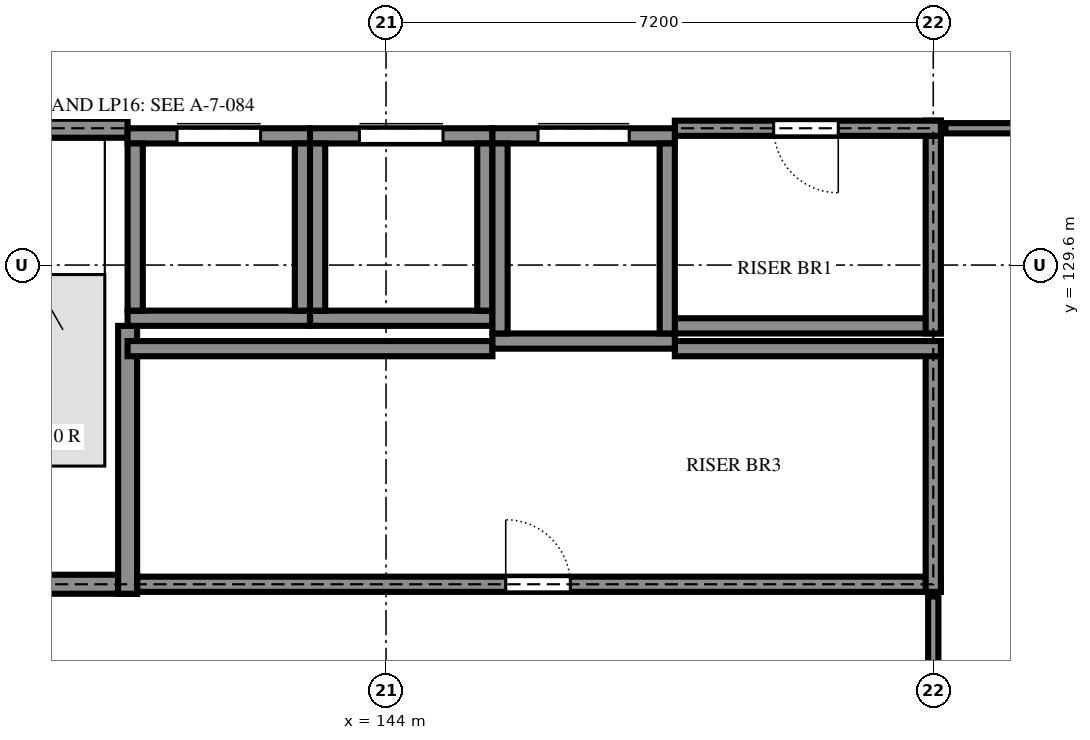
"""IFC4 building model, lengths in metres.
Left out: names, types, materials, properties, quantities, classifications, styles, units other than length and angle.
Written with IfcOpenShell. Run it as: python <this file> out.ifc"""

import sys

from ifc_helpers import new_model, si_unit, direction, frame, frame_2d, origin, place, context, subcontext, project, spatial, rectangle, extrude, element, fill, save


model = new_model("IFC4")
c1 = context("Model", 3, precision=1e-05, world=origin(), true_north=direction((0.0, 1.0)))
c2 = subcontext(c1, "Body", "Model", "MODEL_VIEW")
j1 = project(units=[si_unit("LENGTHUNIT", "METRE"), si_unit("PLANEANGLEUNIT", "RADIAN")], contexts=[c1])
p1 = place(None, origin())
s1 = spatial("IfcSite", under=j1, at=p1, CompositionType="ELEMENT")
p2 = place(p1, origin())
s2 = spatial("IfcBuilding", under=s1, at=p2, CompositionType="ELEMENT")
p3 = place(p2, frame((0.0, 0.0, 3.6)))
s3 = spatial("IfcBuildingStorey", under=s2, at=p3, CompositionType="ELEMENT", Elevation=3.6)
p4 = place(p3, frame((136.675, 125.4, 0.0), z_axis=(0.0, 0.0, 1.0), x_axis=(1.0, 0.0, 0.0)))
e1 = element("IfcWall", 1, at=p4, inside=s3, PredefinedType="SHEAR", context=c2, shape_type="SweptSolid", body=[
    extrude(rectangle(XDim=4.05, YDim=0.25, at=frame_2d((2.025, 0.0))), origin(), (0.0, 0.0, 1.0), 3.6),
])
p5 = place(p4, frame((1.375, 0.0, 0.0)))
e2 = element("IfcOpeningElement", 2, at=p5, cuts=e1, PredefinedType="OPENING", context=c2, shape_type="SweptSolid", body=[
    extrude(rectangle(XDim=1.2, YDim=2.4, at=frame_2d((0.6, 1.2))), frame((0.0, 0.135, 0.0), z_axis=(0.0, -1.0, 0.0), x_axis=(1.0, 0.0, 0.0)), (0.0, 0.0, 1.0), 0.27),
])
p6 = place(p3, frame((140.725, 125.4, 0.0), z_axis=(0.0, 0.0, 1.0), x_axis=(1.0, 0.0, 0.0)))
e3 = element("IfcWall", 3, at=p6, inside=s3, PredefinedType="SHEAR", context=c2, shape_type="SweptSolid", body=[
    extrude(rectangle(XDim=10.575, YDim=0.2, at=frame_2d((5.288, 0.0))), origin(), (0.0, 0.0, 1.0), 3.6),
])
p7 = place(p6, frame((4.85, 0.0, 0.0)))
e4 = element("IfcOpeningElement", 4, at=p7, cuts=e3, PredefinedType="OPENING", context=c2, shape_type="SweptSolid", body=[
    extrude(rectangle(XDim=0.85, YDim=2.1, at=frame_2d((0.425, 1.05))), frame((0.0, 0.11, 0.0), z_axis=(0.0, -1.0, 0.0), x_axis=(1.0, 0.0, 0.0)), (0.0, 0.0, 1.0), 0.22),
])
p8 = place(p3, frame((140.6, 125.275, 0.0), z_axis=(0.0, 0.0, 1.0), x_axis=(0.0, 1.0, 0.0)))
e5 = element("IfcWall", 5, at=p8, inside=s3, PredefinedType="SHEAR", context=c2, shape_type="SweptSolid", body=[
    extrude(rectangle(XDim=3.525, YDim=0.25, at=frame_2d((1.763, 0.0))), origin(), (0.0, 0.0, 1.0), 3.6),
])
p9 = place(p3, frame((151.2, 125.3, 0.0), z_axis=(0.0, 0.0, 1.0), x_axis=(0.0, 1.0, 0.0)))
e6 = element("IfcWall", 6, at=p9, inside=s3, PredefinedType="SHEAR", context=c2, shape_type="SweptSolid", body=[
    extrude(rectangle(XDim=3.3, YDim=0.2, at=frame_2d((1.65, 0.0))), origin(), (0.0, 0.0, 1.0), 3.6),
])
p10 = place(p3, frame((140.6, 128.5, 0.0), z_axis=(0.0, 0.0, 1.0), x_axis=(1.0, 0.0, 0.0)))
e7 = element("IfcWall", 7, at=p10, inside=s3, PredefinedType="SHEAR", context=c2, shape_type="SweptSolid", body=[
    extrude(rectangle(XDim=4.8, YDim=0.2, at=frame_2d((2.4, 0.0))), origin(), (0.0, 0.0, 1.0), 3.6),
])
for number, where, z_axis, x_axis in (
    (8, (147.8, 128.5, 0.0), (0.0, 0.0, 1.0), (1.0, 0.0, 0.0)),
    (9, (147.8, 128.8, 0.0), (0.0, 0.0, 1.0), (1.0, 0.0, 0.0)),
):
    element("IfcWall", number, at=place(p3, frame(where, z_axis=z_axis, x_axis=x_axis)), inside=s3, PredefinedType="SHEAR", context=c2, shape_type="SweptSolid", body=[
        extrude(rectangle(XDim=3.5, YDim=0.2, at=frame_2d((1.75, 0.0))), origin(), (0.0, 0.0, 1.0), 3.6),
    ])
p11 = place(p3, frame((151.2, 128.7, 0.0), z_axis=(0.0, 0.0, 1.0), x_axis=(0.0, 1.0, 0.0)))
e10 = element("IfcWall", 10, at=p11, inside=s3, PredefinedType="SHEAR", context=c2, shape_type="SweptSolid", body=[
    extrude(rectangle(XDim=2.8, YDim=0.2, at=frame_2d((1.4, 0.0))), origin(), (0.0, 0.0, 1.0), 3.6),
])
p12 = place(p3, frame((140.6, 131.4, 0.0), z_axis=(0.0, 0.0, 1.0), x_axis=(-1.0, 0.0, 0.0)))
e11 = element("IfcWall", 11, at=p12, inside=s3, PredefinedType="SHEAR", context=c2, shape_type="SweptSolid", body=[
    extrude(rectangle(XDim=3.925, YDim=0.25, at=frame_2d((1.962, 0.0))), origin(), (0.0, 0.0, 1.0), 3.6),
])
p13 = place(p3, frame((151.3, 131.4, 0.0), z_axis=(0.0, 0.0, 1.0), x_axis=(-1.0, 0.0, 0.0)))
e12 = element("IfcWall", 12, at=p13, inside=s3, PredefinedType="SHEAR", context=c2, shape_type="SweptSolid", body=[
    extrude(rectangle(XDim=3.5, YDim=0.2, at=frame_2d((1.75, 0.0))), origin(), (0.0, 0.0, 1.0), 3.6),
])
p14 = place(p13, frame((1.35, 0.0, 0.0)))
e13 = element("IfcOpeningElement", 13, at=p14, cuts=e12, PredefinedType="OPENING", context=c2, shape_type="SweptSolid", body=[
    extrude(rectangle(XDim=0.85, YDim=2.1, at=frame_2d((0.425, 1.05))), frame((0.0, 0.11, 0.0), z_axis=(0.0, -1.0, 0.0), x_axis=(1.0, 0.0, 0.0)), (0.0, 0.0, 1.0), 0.22),
])
p15 = place(p3, frame((140.6, 128.9, 0.0), z_axis=(0.0, 0.0, 1.0), x_axis=(1.0, 0.0, 0.0)))
e14 = element("IfcWall", 14, at=p15, inside=s3, PredefinedType="SHEAR", context=c2, shape_type="SweptSolid", body=[
    extrude(rectangle(XDim=2.4, YDim=0.2, at=frame_2d((1.2, 0.0))), origin(), (0.0, 0.0, 1.0), 3.6),
])
p16 = place(p3, frame((140.6, 131.3, 0.0), z_axis=(0.0, 0.0, 1.0), x_axis=(1.0, 0.0, 0.0)))
e15 = element("IfcWall", 15, at=p16, inside=s3, PredefinedType="SHEAR", context=c2, shape_type="SweptSolid", body=[
    extrude(rectangle(XDim=2.4, YDim=0.2, at=frame_2d((1.2, 0.0))), origin(), (0.0, 0.0, 1.0), 3.6),
])
p17 = place(p16, frame((0.65, 0.0, 0.0)))
e16 = element("IfcOpeningElement", 16, at=p17, cuts=e15, PredefinedType="OPENING", context=c2, shape_type="SweptSolid", body=[
    extrude(rectangle(XDim=1.1, YDim=2.1, at=frame_2d((0.55, 1.05))), frame((0.0, 0.11, 0.0), z_axis=(0.0, -1.0, 0.0), x_axis=(1.0, 0.0, 0.0)), (0.0, 0.0, 1.0), 0.22),
])
for number, where, z_axis, x_axis in (
    (17, (140.7, 129.0, 0.0), (0.0, 0.0, 1.0), (0.0, 1.0, 0.0)),
    (18, (142.9, 129.0, 0.0), (0.0, 0.0, 1.0), (0.0, 1.0, 0.0)),
):
    element("IfcWall", number, at=place(p3, frame(where, z_axis=z_axis, x_axis=x_axis)), inside=s3, PredefinedType="SHEAR", context=c2, shape_type="SweptSolid", body=[
        extrude(rectangle(XDim=2.2, YDim=0.2, at=frame_2d((1.1, 0.0))), origin(), (0.0, 0.0, 1.0), 3.6),
    ])
p18 = place(p3, frame((143.0, 128.9, 0.0), z_axis=(0.0, 0.0, 1.0), x_axis=(1.0, 0.0, 0.0)))
e19 = element("IfcWall", 19, at=p18, inside=s3, PredefinedType="SHEAR", context=c2, shape_type="SweptSolid", body=[
    extrude(rectangle(XDim=2.4, YDim=0.2, at=frame_2d((1.2, 0.0))), origin(), (0.0, 0.0, 1.0), 3.6),
])
p19 = place(p3, frame((143.0, 131.3, 0.0), z_axis=(0.0, 0.0, 1.0), x_axis=(1.0, 0.0, 0.0)))
e20 = element("IfcWall", 20, at=p19, inside=s3, PredefinedType="SHEAR", context=c2, shape_type="SweptSolid", body=[
    extrude(rectangle(XDim=2.4, YDim=0.2, at=frame_2d((1.2, 0.0))), origin(), (0.0, 0.0, 1.0), 3.6),
])
p20 = place(p19, frame((0.65, 0.0, 0.0)))
e21 = element("IfcOpeningElement", 21, at=p20, cuts=e20, PredefinedType="OPENING", context=c2, shape_type="SweptSolid", body=[
    extrude(rectangle(XDim=1.1, YDim=2.1, at=frame_2d((0.55, 1.05))), frame((0.0, 0.11, 0.0), z_axis=(0.0, -1.0, 0.0), x_axis=(1.0, 0.0, 0.0)), (0.0, 0.0, 1.0), 0.22),
])
for number, where, z_axis, x_axis in (
    (22, (143.1, 129.0, 0.0), (0.0, 0.0, 1.0), (0.0, 1.0, 0.0)),
    (23, (145.3, 129.0, 0.0), (0.0, 0.0, 1.0), (0.0, 1.0, 0.0)),
):
    element("IfcWall", number, at=place(p3, frame(where, z_axis=z_axis, x_axis=x_axis)), inside=s3, PredefinedType="SHEAR", context=c2, shape_type="SweptSolid", body=[
        extrude(rectangle(XDim=2.2, YDim=0.2, at=frame_2d((1.1, 0.0))), origin(), (0.0, 0.0, 1.0), 3.6),
    ])
p21 = place(p3, frame((145.4, 128.6, 0.0), z_axis=(0.0, 0.0, 1.0), x_axis=(1.0, 0.0, 0.0)))
e24 = element("IfcWall", 24, at=p21, inside=s3, PredefinedType="SHEAR", context=c2, shape_type="SweptSolid", body=[
    extrude(rectangle(XDim=2.4, YDim=0.2, at=frame_2d((1.2, 0.0))), origin(), (0.0, 0.0, 1.0), 3.6),
])
p22 = place(p3, frame((145.4, 131.3, 0.0), z_axis=(0.0, 0.0, 1.0), x_axis=(1.0, 0.0, 0.0)))
e25 = element("IfcWall", 25, at=p22, inside=s3, PredefinedType="SHEAR", context=c2, shape_type="SweptSolid", body=[
    extrude(rectangle(XDim=2.4, YDim=0.2, at=frame_2d((1.2, 0.0))), origin(), (0.0, 0.0, 1.0), 3.6),
])
p23 = place(p22, frame((0.6, 0.0, 0.0)))
e26 = element("IfcOpeningElement", 26, at=p23, cuts=e25, PredefinedType="OPENING", context=c2, shape_type="SweptSolid", body=[
    extrude(rectangle(XDim=1.2, YDim=2.1, at=frame_2d((0.6, 1.05))), frame((0.0, 0.11, 0.0), z_axis=(0.0, -1.0, 0.0), x_axis=(1.0, 0.0, 0.0)), (0.0, 0.0, 1.0), 0.22),
])
for number, where, z_axis, x_axis in (
    (27, (145.5, 128.7, 0.0), (0.0, 0.0, 1.0), (0.0, 1.0, 0.0)),
    (28, (147.7, 128.7, 0.0), (0.0, 0.0, 1.0), (0.0, 1.0, 0.0)),
):
    element("IfcWall", number, at=place(p3, frame(where, z_axis=z_axis, x_axis=x_axis)), inside=s3, PredefinedType="SHEAR", context=c2, shape_type="SweptSolid", body=[
        extrude(rectangle(XDim=2.5, YDim=0.2, at=frame_2d((1.25, 0.0))), origin(), (0.0, 0.0, 1.0), 3.6),
    ])
p24 = place(p3, frame((151.2, 122.55, 0.0), z_axis=(0.0, 0.0, 1.0), x_axis=(0.0, 1.0, 0.0)))
e29 = element("IfcWall", 29, at=p24, inside=s3, PredefinedType="PARTITIONING", context=c2, shape_type="SweptSolid", body=[
    extrude(rectangle(XDim=2.69, YDim=0.135, at=frame_2d((1.345, 0.0))), origin(), (0.0, 0.0, 1.0), 3.22),
])
p25 = place(p3, frame((172.615, 131.4, 0.0), z_axis=(0.0, 0.0, 1.0), x_axis=(-1.0, 0.0, 0.0)))
e30 = element("IfcWall", 30, at=p25, inside=s3, PredefinedType="PARTITIONING", context=c2, shape_type="SweptSolid", body=[
    extrude(rectangle(XDim=21.255, YDim=0.135, at=frame_2d((10.627, 0.0))), origin(), (0.0, 0.0, 1.0), 3.38),
])
p26 = place(p25, frame((10.15, 0.0, 0.0)))
e31 = element("IfcOpeningElement", 31, at=p26, cuts=e30, PredefinedType="OPENING", context=c2, shape_type="SweptSolid", body=[
    extrude(rectangle(XDim=1.0, YDim=2.4, at=frame_2d((0.5, 1.2))), frame((0.0, 0.077, 0.0), z_axis=(0.0, -1.0, 0.0), x_axis=(1.0, 0.0, 0.0)), (0.0, 0.0, 1.0), 0.155),
])
p27 = place(p17, origin())
e32 = element("IfcDoor", 32, at=p27, inside=s3, OperationType="SLIDING_TO_LEFT", PredefinedType="DOOR", context=c2, shape_type="SweptSolid", body=[
    extrude(rectangle(XDim=1.1, YDim=2.1, at=frame_2d((0.55, 1.05))), frame((0.0, 0.025, 0.0), z_axis=(0.0, -1.0, 0.0), x_axis=(1.0, 0.0, 0.0)), (0.0, 0.0, 1.0), 0.05),
])
fill(e16, e32)
p28 = place(p20, origin())
e33 = element("IfcDoor", 33, at=p28, inside=s3, OperationType="SLIDING_TO_LEFT", PredefinedType="DOOR", context=c2, shape_type="SweptSolid", body=[
    extrude(rectangle(XDim=1.1, YDim=2.1, at=frame_2d((0.55, 1.05))), frame((0.0, 0.025, 0.0), z_axis=(0.0, -1.0, 0.0), x_axis=(1.0, 0.0, 0.0)), (0.0, 0.0, 1.0), 0.05),
])
fill(e21, e33)
p29 = place(p23, origin())
e34 = element("IfcDoor", 34, at=p29, inside=s3, OperationType="SLIDING_TO_LEFT", PredefinedType="DOOR", context=c2, shape_type="SweptSolid", body=[
    extrude(rectangle(XDim=1.2, YDim=2.1, at=frame_2d((0.6, 1.05))), frame((0.0, 0.025, 0.0), z_axis=(0.0, -1.0, 0.0), x_axis=(1.0, 0.0, 0.0)), (0.0, 0.0, 1.0), 0.05),
])
fill(e26, e34)
p30 = place(p14, origin())
e35 = element("IfcDoor", 35, at=p30, inside=s3, OperationType="SINGLE_SWING_RIGHT", PredefinedType="DOOR", context=c2, shape_type="SweptSolid", body=[
    extrude(rectangle(XDim=0.85, YDim=2.1, at=frame_2d((0.425, 1.05))), frame((0.0, 0.025, 0.0), z_axis=(0.0, -1.0, 0.0), x_axis=(1.0, 0.0, 0.0)), (0.0, 0.0, 1.0), 0.05),
])
fill(e13, e35)
p31 = place(p7, origin())
e36 = element("IfcDoor", 36, at=p31, inside=s3, OperationType="SINGLE_SWING_RIGHT", PredefinedType="DOOR", context=c2, shape_type="SweptSolid", body=[
    extrude(rectangle(XDim=0.85, YDim=2.1, at=frame_2d((0.425, 1.05))), frame((0.0, 0.025, 0.0), z_axis=(0.0, -1.0, 0.0), x_axis=(1.0, 0.0, 0.0)), (0.0, 0.0, 1.0), 0.05),
])
fill(e4, e36)
save(model, sys.argv[1])
